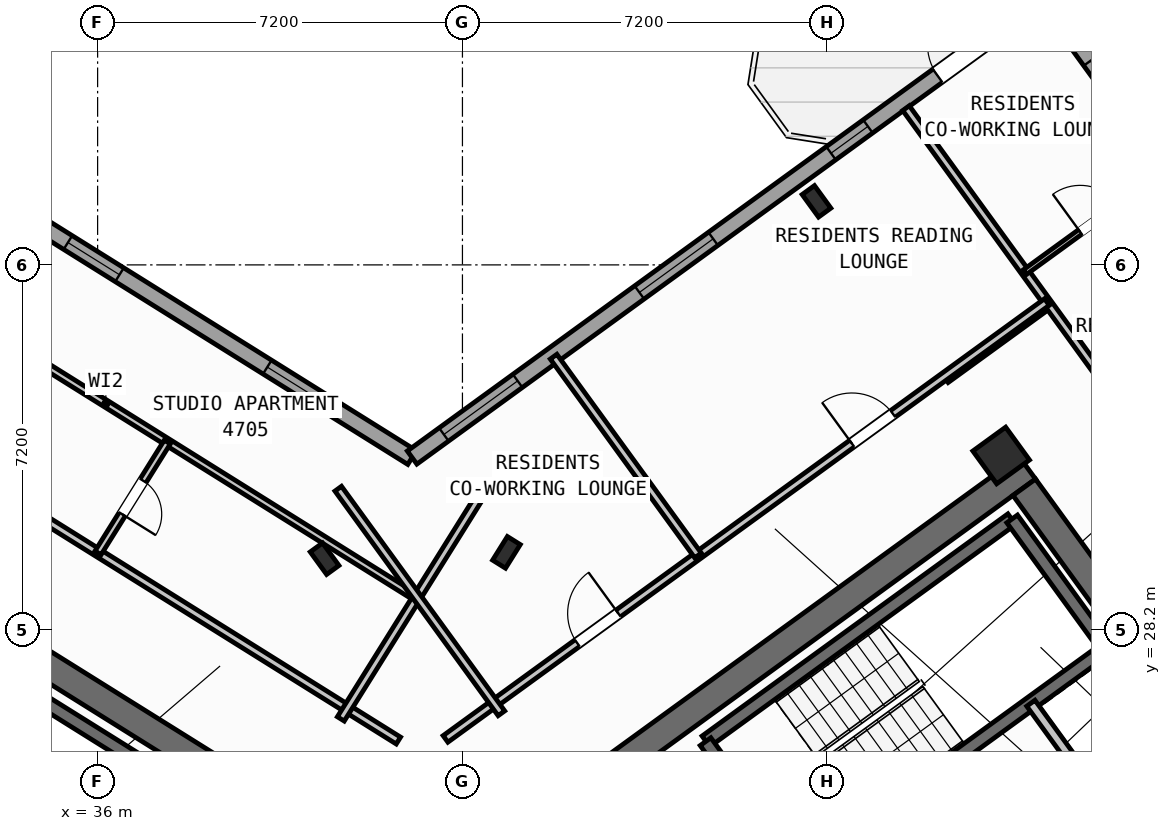
"""IFC4 building model, lengths in metres.
Left out: names, types, materials, properties, quantities, classifications, styles, units other than length and angle.
Written with IfcOpenShell. Run it as: python <this file> out.ifc"""

import sys

from ifc_helpers import new_model, si_unit, direction, frame, frame_2d, origin, origin_2d, place, context, subcontext, project, spatial, rectangle, hollow_rectangle, i_section, extrude, source, transform, mapped, element, fill, save


model = new_model("IFC4")
c1 = context("Model", 3, precision=1e-05, world=origin(), true_north=direction((0.0, 1.0)))
c2 = subcontext(c1, "Body", "Model", "MODEL_VIEW")
j1 = project(units=[si_unit("LENGTHUNIT", "METRE"), si_unit("PLANEANGLEUNIT", "RADIAN")], contexts=[c1])
p1 = place(None, origin())
s1 = spatial("IfcSite", under=j1, at=p1, CompositionType="ELEMENT")
p2 = place(p1, origin())
s2 = spatial("IfcBuilding", under=s1, at=p2, CompositionType="ELEMENT")
p3 = place(p2, frame((0.0, 0.0, 187.8)))
s3 = spatial("IfcBuildingStorey", under=s2, at=p3, CompositionType="ELEMENT", Elevation=187.8)
p4 = place(p3, frame((40.573, 24.01, 0.0), z_axis=(0.0, 0.0, 1.0), x_axis=(-0.848047359947, 0.529920442413, 0.0)))
e1 = element("IfcWall", 1, at=p4, inside=s3, PredefinedType="SHEAR", context=c2, shape_type="SweptSolid", body=[
    extrude(rectangle(XDim=13.14, YDim=0.55, at=frame_2d((6.57, 0.0))), origin(), (0.0, 0.0, 1.0), 3.35),
])
p5 = place(p3, frame((44.365, 24.142, 0.0), z_axis=(0.0, 0.0, 1.0), x_axis=(0.809024304885, 0.587775190107, 0.0)))
e2 = element("IfcWall", 2, at=p5, inside=s3, PredefinedType="SHEAR", context=c2, shape_type="SweptSolid", body=[
    extrude(rectangle(XDim=12.34, YDim=0.55, at=frame_2d((6.17, 0.0))), origin(), (0.0, 0.0, 1.0), 3.35),
])
p6 = place(p3, frame((58.064, 25.813, 0.0), z_axis=(0.0, 0.0, 1.0), x_axis=(-0.587764933797, 0.809031756236, 0.0)))
e3 = element("IfcWall", 3, at=p6, inside=s3, PredefinedType="SHEAR", context=c2, shape_type="SweptSolid", body=[
    extrude(rectangle(XDim=6.425, YDim=0.55, at=frame_2d((3.212, 0.0))), origin(), (0.0, 0.0, 1.0), 3.35),
])
m1 = source(origin(), c2, "Body", "SweptSolid", [
    extrude(i_section(OverallWidth=0.3, OverallDepth=0.55, WebThickness=0.015, FlangeThickness=0.029, at=origin_2d()), origin(), (0.0, 0.0, 1.0), 3.6),
])
for number, where, z_axis, x_axis in (
    (4, (44.068, 29.726, 0.0), (0.0, 0.0, 1.0), (-0.848, 0.53, 0.0)),
    (5, (40.479, 29.601, 0.0), (0.0, 0.0, 1.0), (0.809, 0.588, 0.0)),
):
    element("IfcColumn", number, at=place(p3, frame(where, z_axis=z_axis, x_axis=x_axis)), inside=s3, PredefinedType="COLUMN", context=c2, shape_type="MappedRepresentation", body=[
        mapped(m1, transform((0.0, 0.0, 0.0), scale=1.0)),
    ])
m2 = source(origin(), c2, "Body", "SweptSolid", [
    extrude(hollow_rectangle(XDim=0.8, YDim=0.8, WallThickness=0.032, at=origin_2d()), origin(), (0.0, 0.0, 1.0), 3.6),
])
p7 = place(p3, frame((53.832, 31.638, 0.0), z_axis=(0.0, 0.0, 1.0), x_axis=(0.809016994375, 0.587785252292, 0.0)))
e6 = element("IfcColumn", 6, at=p7, inside=s3, PredefinedType="COLUMN", context=c2, shape_type="MappedRepresentation", body=[
    mapped(m2, transform((0.0, 0.0, 0.0), scale=1.0)),
])
p8 = place(p3, frame((50.188, 36.654, 0.0), z_axis=(0.0, 0.0, 1.0), x_axis=(0.809016994375, 0.587785252292, 0.0)))
e7 = element("IfcColumn", 7, at=p8, inside=s3, PredefinedType="COLUMN", context=c2, shape_type="MappedRepresentation", body=[
    mapped(m1, transform((0.0, 0.0, 0.0), scale=1.0)),
])
p9 = place(p3, frame((17.424, 47.083, 0.0), z_axis=(0.0, 0.0, 1.0), x_axis=(0.848049927979, -0.529916332693, 0.0)))
e8 = element("IfcWall", 8, at=p9, inside=s3, PredefinedType="STANDARD", context=c2, shape_type="SweptSolid", body=[
    extrude(rectangle(XDim=29.223, YDim=0.32, at=frame_2d((14.612, 0.0))), origin(), (0.0, 0.0, 1.0), 3.35),
])
p10 = place(p9, frame((3.764, 0.0, 0.0)))
e9 = element("IfcOpeningElement", 9, at=p10, cuts=e8, PredefinedType="OPENING", context=c2, shape_type="SweptSolid", body=[
    extrude(rectangle(XDim=1.05, YDim=2.15, at=frame_2d((0.525, 1.075))), frame((0.0, 0.17, 0.0), z_axis=(0.0, -1.0, 0.0), x_axis=(1.0, 0.0, 0.0)), (0.0, 0.0, 1.0), 0.34),
])
p11 = place(p9, frame((8.344, 0.0, 0.8)))
e10 = element("IfcOpeningElement", 10, at=p11, cuts=e8, PredefinedType="OPENING", context=c2, shape_type="SweptSolid", body=[
    extrude(rectangle(XDim=2.1, YDim=1.55, at=frame_2d((1.05, 0.775))), frame((0.0, 0.17, 0.0), z_axis=(0.0, -1.0, 0.0), x_axis=(1.0, 0.0, 0.0)), (0.0, 0.0, 1.0), 0.34),
])
p12 = place(p9, frame((13.589, 0.0, 0.85)))
e11 = element("IfcOpeningElement", 11, at=p12, cuts=e8, PredefinedType="OPENING", context=c2, shape_type="SweptSolid", body=[
    extrude(rectangle(XDim=1.8, YDim=1.5, at=frame_2d((0.9, 0.75))), frame((0.0, 0.17, 0.0), z_axis=(0.0, -1.0, 0.0), x_axis=(1.0, 0.0, 0.0)), (0.0, 0.0, 1.0), 0.34),
])
p13 = place(p9, frame((17.104, 0.0, 0.95)))
e12 = element("IfcOpeningElement", 12, at=p13, cuts=e8, PredefinedType="OPENING", context=c2, shape_type="SweptSolid", body=[
    extrude(rectangle(XDim=1.2, YDim=1.4, at=frame_2d((0.6, 0.7))), frame((0.0, 0.17, 0.0), z_axis=(0.0, -1.0, 0.0), x_axis=(1.0, 0.0, 0.0)), (0.0, 0.0, 1.0), 0.34),
])
p14 = place(p9, frame((21.214, 0.0, 0.95)))
e13 = element("IfcOpeningElement", 13, at=p14, cuts=e8, PredefinedType="OPENING", context=c2, shape_type="SweptSolid", body=[
    extrude(rectangle(XDim=1.2, YDim=1.4, at=frame_2d((0.6, 0.7))), frame((0.0, 0.17, 0.0), z_axis=(0.0, -1.0, 0.0), x_axis=(1.0, 0.0, 0.0)), (0.0, 0.0, 1.0), 0.34),
])
p15 = place(p9, frame((25.853, 0.0, 0.95)))
e14 = element("IfcOpeningElement", 14, at=p15, cuts=e8, PredefinedType="OPENING", context=c2, shape_type="SweptSolid", body=[
    extrude(rectangle(XDim=1.2, YDim=1.4, at=frame_2d((0.6, 0.7))), frame((0.0, 0.17, 0.0), z_axis=(0.0, -1.0, 0.0), x_axis=(1.0, 0.0, 0.0)), (0.0, 0.0, 1.0), 0.34),
])
p16 = place(p3, frame((42.207, 31.597, 0.0), z_axis=(0.0, 0.0, 1.0), x_axis=(0.809020333377, 0.587780656523, 0.0)))
e15 = element("IfcWall", 15, at=p16, inside=s3, PredefinedType="STANDARD", context=c2, shape_type="SweptSolid", body=[
    extrude(rectangle(XDim=15.223, YDim=0.32, at=frame_2d((7.611, 0.0))), origin(), (0.0, 0.0, 1.0), 3.35),
])
p17 = place(p16, frame((12.82, 0.0, 0.0)))
e16 = element("IfcOpeningElement", 16, at=p17, cuts=e15, PredefinedType="OPENING", context=c2, shape_type="SweptSolid", body=[
    extrude(rectangle(XDim=1.05, YDim=2.15, at=frame_2d((0.525, 1.075))), frame((0.0, 0.17, 0.0), z_axis=(0.0, -1.0, 0.0), x_axis=(1.0, 0.0, 0.0)), (0.0, 0.0, 1.0), 0.34),
])
p18 = place(p16, frame((0.775, 0.0, 0.85)))
e17 = element("IfcOpeningElement", 17, at=p18, cuts=e15, PredefinedType="OPENING", context=c2, shape_type="SweptSolid", body=[
    extrude(rectangle(XDim=1.8, YDim=1.5, at=frame_2d((0.9, 0.75))), frame((0.0, 0.17, 0.0), z_axis=(0.0, -1.0, 0.0), x_axis=(1.0, 0.0, 0.0)), (0.0, 0.0, 1.0), 0.34),
])
p19 = place(p16, frame((5.544, 0.0, 0.85)))
e18 = element("IfcOpeningElement", 18, at=p19, cuts=e15, PredefinedType="OPENING", context=c2, shape_type="SweptSolid", body=[
    extrude(rectangle(XDim=1.8, YDim=1.5, at=frame_2d((0.9, 0.75))), frame((0.0, 0.17, 0.0), z_axis=(0.0, -1.0, 0.0), x_axis=(1.0, 0.0, 0.0)), (0.0, 0.0, 1.0), 0.34),
])
p20 = place(p16, frame((10.219, 0.0, 1.0)))
e19 = element("IfcOpeningElement", 19, at=p20, cuts=e15, PredefinedType="OPENING", context=c2, shape_type="SweptSolid", body=[
    extrude(rectangle(XDim=0.9, YDim=1.25, at=frame_2d((0.45, 0.625))), frame((0.0, 0.17, 0.0), z_axis=(0.0, -1.0, 0.0), x_axis=(1.0, 0.0, 0.0)), (0.0, 0.0, 1.0), 0.34),
])
p21 = place(p3, frame((54.81, 40.5, 0.0), z_axis=(0.0, 0.0, 1.0), x_axis=(0.587783625747, -0.809018176127, 0.0)))
e20 = element("IfcWall", 20, at=p21, inside=s3, PredefinedType="STANDARD", context=c2, shape_type="SweptSolid", body=[
    extrude(rectangle(XDim=21.587, YDim=0.32, at=frame_2d((10.794, 0.0))), origin(), (0.0, 0.0, 1.0), 2.825),
])
p22 = place(p21, frame((1.328, 0.0, 0.85)))
e21 = element("IfcOpeningElement", 21, at=p22, cuts=e20, PredefinedType="OPENING", context=c2, shape_type="SweptSolid", body=[
    extrude(rectangle(XDim=1.8, YDim=1.5, at=frame_2d((0.9, 0.75))), frame((0.0, 0.17, 0.0), z_axis=(0.0, -1.0, 0.0), x_axis=(1.0, 0.0, 0.0)), (0.0, 0.0, 1.0), 0.34),
])
p23 = place(p21, frame((4.695, 0.0, 1.0)))
e22 = element("IfcOpeningElement", 22, at=p23, cuts=e20, PredefinedType="OPENING", context=c2, shape_type="SweptSolid", body=[
    extrude(rectangle(XDim=0.9, YDim=1.25, at=frame_2d((0.45, 0.625))), frame((0.0, 0.17, 0.0), z_axis=(0.0, -1.0, 0.0), x_axis=(1.0, 0.0, 0.0)), (0.0, 0.0, 1.0), 0.34),
])
p24 = place(p21, frame((7.829, 0.0, 0.85)))
e23 = element("IfcOpeningElement", 23, at=p24, cuts=e20, PredefinedType="OPENING", context=c2, shape_type="SweptSolid", body=[
    extrude(rectangle(XDim=1.5, YDim=1.5, at=frame_2d((0.75, 0.75))), frame((0.0, 0.17, 0.0), z_axis=(0.0, -1.0, 0.0), x_axis=(1.0, 0.0, 0.0)), (0.0, 0.0, 1.0), 0.34),
])
p25 = place(p21, frame((15.542, 0.0, 0.95)))
e24 = element("IfcOpeningElement", 24, at=p25, cuts=e20, PredefinedType="OPENING", context=c2, shape_type="SweptSolid", body=[
    extrude(rectangle(XDim=1.2, YDim=1.4, at=frame_2d((0.6, 0.7))), frame((0.0, 0.17, 0.0), z_axis=(0.0, -1.0, 0.0), x_axis=(1.0, 0.0, 0.0)), (0.0, 0.0, 1.0), 0.34),
])
p26 = place(p21, frame((19.097, 0.0, 1.0)))
e25 = element("IfcOpeningElement", 25, at=p26, cuts=e20, PredefinedType="OPENING", context=c2, shape_type="SweptSolid", body=[
    extrude(rectangle(XDim=0.9, YDim=1.25, at=frame_2d((0.45, 0.625))), frame((0.0, 0.17, 0.0), z_axis=(0.0, -1.0, 0.0), x_axis=(1.0, 0.0, 0.0)), (0.0, 0.0, 1.0), 0.34),
])
p27 = place(p3, frame((39.721, 23.788, 0.0), z_axis=(0.0, 0.0, 1.0), x_axis=(-0.848054434086, 0.529909121291, 0.0)))
e26 = element("IfcWall", 26, at=p27, inside=s3, PredefinedType="SHEAR", context=c2, shape_type="SweptSolid", body=[
    extrude(rectangle(XDim=7.33, YDim=0.26, at=frame_2d((3.665, 0.0))), origin(), (0.0, 0.0, 1.0), 3.35),
])
p28 = place(p3, frame((48.006, 25.996, 0.0), z_axis=(0.0, 0.0, 1.0), x_axis=(0.80901903764, 0.587782439969, 0.0)))
e27 = element("IfcWall", 27, at=p28, inside=s3, PredefinedType="SHEAR", context=c2, shape_type="SweptSolid", body=[
    extrude(rectangle(XDim=7.46, YDim=0.26, at=frame_2d((3.73, 0.0))), origin(), (0.0, 0.0, 1.0), 3.35),
])
p29 = place(p3, frame((49.863, 23.44, 0.0), z_axis=(0.0, 0.0, 1.0), x_axis=(0.809003474932, 0.587803859759, 0.0)))
e28 = element("IfcWall", 28, at=p29, inside=s3, PredefinedType="SHEAR", context=c2, shape_type="SweptSolid", body=[
    extrude(rectangle(XDim=7.46, YDim=0.26, at=frame_2d((3.73, 0.0))), origin(), (0.0, 0.0, 1.0), 3.35),
])
p30 = place(p29, frame((0.36, 0.0, 0.0)))
e29 = element("IfcOpeningElement", 29, at=p30, cuts=e28, PredefinedType="OPENING", context=c2, shape_type="SweptSolid", body=[
    extrude(rectangle(XDim=0.86, YDim=2.05, at=frame_2d((0.43, 1.025))), frame((0.0, 0.14, 0.0), z_axis=(0.0, -1.0, 0.0), x_axis=(1.0, 0.0, 0.0)), (0.0, 0.0, 1.0), 0.28),
])
p31 = place(p3, frame((49.855, 23.434, 0.0), z_axis=(0.0, 0.0, 1.0), x_axis=(-0.58776738483, 0.809029975545, 0.0)))
e30 = element("IfcWall", 30, at=p31, inside=s3, PredefinedType="SHEAR", context=c2, shape_type="SweptSolid", body=[
    extrude(rectangle(XDim=3.16, YDim=0.26, at=frame_2d((1.58, 0.0))), origin(), (0.0, 0.0, 1.0), 3.35),
])
p32 = place(p3, frame((55.906, 27.831, 0.0), z_axis=(0.0, 0.0, 1.0), x_axis=(-0.587804123638, 0.809003283204, 0.0)))
e31 = element("IfcWall", 31, at=p32, inside=s3, PredefinedType="SHEAR", context=c2, shape_type="SweptSolid", body=[
    extrude(rectangle(XDim=3.16, YDim=0.26, at=frame_2d((1.58, 0.0))), origin(), (0.0, 0.0, 1.0), 3.35),
])
p33 = place(p3, frame((56.111, 24.419, 0.0), z_axis=(0.0, 0.0, 1.0), x_axis=(-0.58777848983, 0.809021907548, 0.0)))
e32 = element("IfcWall", 32, at=p33, inside=s3, PredefinedType="STANDARD", context=c2, shape_type="SweptSolid", body=[
    extrude(rectangle(XDim=2.88, YDim=0.2, at=frame_2d((1.44, 0.0))), origin(), (0.0, 0.0, 1.0), 3.34),
])
p34 = place(p3, frame((41.936, 26.012, 0.0), z_axis=(0.0, 0.0, 1.0), x_axis=(-0.848051154596, 0.529914369676, 0.0)))
e33 = element("IfcWall", 33, at=p34, inside=s3, PredefinedType="PARTITIONING", context=c2, shape_type="SweptSolid", body=[
    extrude(rectangle(XDim=15.57, YDim=0.16, at=frame_2d((7.785, 0.0))), origin(), (0.0, 0.0, 1.0), 3.34),
])
p35 = place(p34, frame((10.83, 0.0, 0.0)))
e34 = element("IfcOpeningElement", 34, at=p35, cuts=e33, PredefinedType="OPENING", context=c2, shape_type="SweptSolid", body=[
    extrude(rectangle(XDim=1.0, YDim=2.1, at=frame_2d((0.5, 1.05))), frame((0.0, 0.09, 0.0), z_axis=(0.0, -1.0, 0.0), x_axis=(1.0, 0.0, 0.0)), (0.0, 0.0, 1.0), 0.18),
])
p36 = place(p3, frame((43.704, 31.086, 0.0), z_axis=(0.0, 0.0, 1.0), x_axis=(-0.529906828443, -0.848055866774, 0.0)))
e35 = element("IfcWall", 35, at=p36, inside=s3, PredefinedType="PARTITIONING", context=c2, shape_type="SweptSolid", body=[
    extrude(rectangle(XDim=5.48, YDim=0.16, at=frame_2d((2.74, 0.0))), origin(), (0.0, 0.0, 1.0), 3.34),
])
p37 = place(p3, frame((42.226, 28.873, 0.0), z_axis=(0.0, 0.0, 1.0), x_axis=(-0.848049134363, 0.529917602752, 0.0)))
e36 = element("IfcWall", 36, at=p37, inside=s3, PredefinedType="PLUMBINGWALL", context=c2, shape_type="SweptSolid", body=[
    extrude(rectangle(XDim=14.3, YDim=0.14, at=frame_2d((7.15, 0.0))), origin(), (0.0, 0.0, 1.0), 3.34),
])
p38 = place(p37, frame((9.57, 0.0, 0.0)))
e37 = element("IfcOpeningElement", 37, at=p38, cuts=e36, PredefinedType="OPENING", context=c2, shape_type="SweptSolid", body=[
    extrude(rectangle(XDim=0.92, YDim=2.08, at=frame_2d((0.46, 1.04))), frame((0.0, 0.08, 0.0), z_axis=(0.0, -1.0, 0.0), x_axis=(1.0, 0.0, 0.0)), (0.0, 0.0, 1.0), 0.16),
])
p39 = place(p3, frame((37.375, 31.904, 0.0), z_axis=(0.0, 0.0, 1.0), x_axis=(-0.529913878929, -0.848051461244, 0.0)))
e38 = element("IfcWall", 38, at=p39, inside=s3, PredefinedType="PLUMBINGWALL", context=c2, shape_type="SweptSolid", body=[
    extrude(rectangle(XDim=2.58, YDim=0.14, at=frame_2d((1.29, 0.0))), origin(), (0.0, 0.0, 1.0), 3.34),
])
p40 = place(p39, frame((0.9, 0.0, 0.0)))
e39 = element("IfcOpeningElement", 39, at=p40, cuts=e38, PredefinedType="OPENING", context=c2, shape_type="SweptSolid", body=[
    extrude(rectangle(XDim=0.78, YDim=2.05, at=frame_2d((0.39, 1.025))), frame((0.0, 0.08, 0.0), z_axis=(0.0, -1.0, 0.0), x_axis=(1.0, 0.0, 0.0)), (0.0, 0.0, 1.0), 0.16),
])
p41 = place(p3, frame((52.739, 33.143, 0.0), z_axis=(0.0, 0.0, 1.0), x_axis=(0.809000999347, 0.58780726693, 0.0)))
e40 = element("IfcWall", 40, at=p41, inside=s3, PredefinedType="PARTITIONING", context=c2, shape_type="SweptSolid", body=[
    extrude(rectangle(XDim=2.51, YDim=0.16, at=frame_2d((1.255, 0.0))), origin(), (0.0, 0.0, 1.0), 3.34),
])
p42 = place(p3, frame((58.067, 30.08, 0.0), z_axis=(0.0, 0.0, 1.0), x_axis=(-0.587787785243, 0.809015154073, 0.0)))
e41 = element("IfcWall", 41, at=p42, inside=s3, PredefinedType="PARTITIONING", context=c2, shape_type="SweptSolid", body=[
    extrude(rectangle(XDim=10.4, YDim=0.16, at=frame_2d((5.2, 0.0))), origin(), (0.0, 0.0, 1.0), 3.34),
])
p43 = place(p3, frame((54.304, 35.259, 0.0), z_axis=(0.0, 0.0, 1.0), x_axis=(0.809005039917, 0.58780170584, 0.0)))
e42 = element("IfcWall", 42, at=p43, inside=s3, PredefinedType="PARTITIONING", context=c2, shape_type="SweptSolid", body=[
    extrude(rectangle(XDim=3.61, YDim=0.11, at=frame_2d((1.805, 0.0))), origin(), (0.0, 0.0, 1.0), 3.34),
])
p44 = place(p43, frame((1.345, 0.0, 0.0)))
e43 = element("IfcOpeningElement", 43, at=p44, cuts=e42, PredefinedType="OPENING", context=c2, shape_type="SweptSolid", body=[
    extrude(rectangle(XDim=0.92, YDim=2.08, at=frame_2d((0.46, 1.04))), frame((0.0, 0.065, 0.0), z_axis=(0.0, -1.0, 0.0), x_axis=(1.0, 0.0, 0.0)), (0.0, 0.0, 1.0), 0.13),
])
p45 = place(p3, frame((42.866, 26.044, 0.0), z_axis=(0.0, 0.0, 1.0), x_axis=(0.809020254154, 0.587780765566, 0.0)))
e44 = element("IfcWall", 44, at=p45, inside=s3, PredefinedType="PARTITIONING", context=c2, shape_type="SweptSolid", body=[
    extrude(rectangle(XDim=14.67, YDim=0.16, at=frame_2d((7.335, 0.0))), origin(), (0.0, 0.0, 1.0), 3.34),
])
p46 = place(p45, frame((3.215, 0.0, 0.0)))
e45 = element("IfcOpeningElement", 45, at=p46, cuts=e44, PredefinedType="OPENING", context=c2, shape_type="SweptSolid", body=[
    extrude(rectangle(XDim=1.0, YDim=2.1, at=frame_2d((0.5, 1.05))), frame((0.0, 0.09, 0.0), z_axis=(0.0, -1.0, 0.0), x_axis=(1.0, 0.0, 0.0)), (0.0, 0.0, 1.0), 0.18),
])
p47 = place(p45, frame((9.915, 0.0, 0.0)))
e46 = element("IfcOpeningElement", 46, at=p47, cuts=e44, PredefinedType="OPENING", context=c2, shape_type="SweptSolid", body=[
    extrude(rectangle(XDim=1.0, YDim=2.1, at=frame_2d((0.5, 1.05))), frame((0.0, 0.09, 0.0), z_axis=(0.0, -1.0, 0.0), x_axis=(1.0, 0.0, 0.0)), (0.0, 0.0, 1.0), 0.18),
])
p48 = place(p3, frame((43.969, 26.55, 0.0), z_axis=(0.0, 0.0, 1.0), x_axis=(-0.587776919386, 0.80902304852, 0.0)))
e47 = element("IfcWall", 47, at=p48, inside=s3, PredefinedType="PARTITIONING", context=c2, shape_type="SweptSolid", body=[
    extrude(rectangle(XDim=5.48, YDim=0.16, at=frame_2d((2.74, 0.0))), origin(), (0.0, 0.0, 1.0), 3.34),
])
p49 = place(p3, frame((47.849, 29.665, 0.0), z_axis=(0.0, 0.0, 1.0), x_axis=(-0.587785532001, 0.809016791155, 0.0)))
e48 = element("IfcWall", 48, at=p49, inside=s3, PredefinedType="PARTITIONING", context=c2, shape_type="SweptSolid", body=[
    extrude(rectangle(XDim=4.85, YDim=0.16, at=frame_2d((2.425, 0.0))), origin(), (0.0, 0.0, 1.0), 3.34),
])
m3 = source(origin(), c2, "Body", "SweptSolid", [
    extrude(rectangle(XDim=1.05, YDim=2.15, at=frame_2d((0.525, 1.075))), frame((0.0, 0.025, 0.0), z_axis=(0.0, -1.0, 0.0), x_axis=(1.0, 0.0, 0.0)), (0.0, 0.0, 1.0), 0.05),
])
p50 = place(p17, origin())
e49 = element("IfcDoor", 49, at=p50, inside=s3, OperationType="SINGLE_SWING_RIGHT", PredefinedType="DOOR", context=c2, shape_type="MappedRepresentation", body=[
    mapped(m3, transform((0.0, 0.0, 0.0), scale=1.0)),
])
fill(e16, e49)
m4 = source(origin(), c2, "Body", "SweptSolid", [
    extrude(rectangle(XDim=1.2, YDim=1.4, at=frame_2d((0.6, 0.7))), frame((0.0, 0.03, 0.0), z_axis=(0.0, -1.0, 0.0), x_axis=(1.0, 0.0, 0.0)), (0.0, 0.0, 1.0), 0.06),
])
p51 = place(p14, origin())
e50 = element("IfcWindow", 50, at=p51, inside=s3, PartitioningType="SINGLE_PANEL", PredefinedType="WINDOW", context=c2, shape_type="MappedRepresentation", body=[
    mapped(m4, transform((0.0, 0.0, 0.0), scale=1.0)),
])
fill(e13, e50)
p52 = place(p15, origin())
e51 = element("IfcWindow", 51, at=p52, inside=s3, PartitioningType="SINGLE_PANEL", PredefinedType="WINDOW", context=c2, shape_type="MappedRepresentation", body=[
    mapped(m4, transform((0.0, 0.0, 0.0), scale=1.0)),
])
fill(e14, e51)
m5 = source(origin(), c2, "Body", "SweptSolid", [
    extrude(rectangle(XDim=1.8, YDim=1.5, at=frame_2d((0.9, 0.75))), frame((0.0, 0.03, 0.0), z_axis=(0.0, -1.0, 0.0), x_axis=(1.0, 0.0, 0.0)), (0.0, 0.0, 1.0), 0.06),
])
p53 = place(p18, origin())
e52 = element("IfcWindow", 52, at=p53, inside=s3, PartitioningType="SINGLE_PANEL", PredefinedType="WINDOW", context=c2, shape_type="MappedRepresentation", body=[
    mapped(m5, transform((0.0, 0.0, 0.0), scale=1.0)),
])
fill(e17, e52)
p54 = place(p19, origin())
e53 = element("IfcWindow", 53, at=p54, inside=s3, PartitioningType="SINGLE_PANEL", PredefinedType="WINDOW", context=c2, shape_type="MappedRepresentation", body=[
    mapped(m5, transform((0.0, 0.0, 0.0), scale=1.0)),
])
fill(e18, e53)
m6 = source(origin(), c2, "Body", "SweptSolid", [
    extrude(rectangle(XDim=0.9, YDim=1.25, at=frame_2d((0.45, 0.625))), frame((0.0, 0.03, 0.0), z_axis=(0.0, -1.0, 0.0), x_axis=(1.0, 0.0, 0.0)), (0.0, 0.0, 1.0), 0.06),
])
p55 = place(p20, origin())
e54 = element("IfcWindow", 54, at=p55, inside=s3, PartitioningType="SINGLE_PANEL", PredefinedType="WINDOW", context=c2, shape_type="MappedRepresentation", body=[
    mapped(m6, transform((0.0, 0.0, 0.0), scale=1.0)),
])
fill(e19, e54)
p56 = place(p22, origin())
e55 = element("IfcWindow", 55, at=p56, inside=s3, PartitioningType="SINGLE_PANEL", PredefinedType="WINDOW", context=c2, shape_type="MappedRepresentation", body=[
    mapped(m5, transform((0.0, 0.0, 0.0), scale=1.0)),
])
fill(e21, e55)
m7 = source(origin(), c2, "Body", "SweptSolid", [
    extrude(rectangle(XDim=0.78, YDim=2.05, at=frame_2d((0.39, 1.025))), frame((0.0, 0.025, 0.0), z_axis=(0.0, -1.0, 0.0), x_axis=(1.0, 0.0, 0.0)), (0.0, 0.0, 1.0), 0.05),
])
p57 = place(p40, origin())
e56 = element("IfcDoor", 56, at=p57, inside=s3, OperationType="SINGLE_SWING_RIGHT", PredefinedType="DOOR", context=c2, shape_type="MappedRepresentation", body=[
    mapped(m7, transform((0.0, 0.0, 0.0), scale=1.0)),
])
fill(e39, e56)
m8 = source(origin(), c2, "Body", "SweptSolid", [
    extrude(rectangle(XDim=0.92, YDim=2.08, at=frame_2d((0.46, 1.04))), frame((0.0, 0.025, 0.0), z_axis=(0.0, -1.0, 0.0), x_axis=(1.0, 0.0, 0.0)), (0.0, 0.0, 1.0), 0.05),
])
p58 = place(p44, origin())
e57 = element("IfcDoor", 57, at=p58, inside=s3, OperationType="SINGLE_SWING_LEFT", PredefinedType="DOOR", context=c2, shape_type="MappedRepresentation", body=[
    mapped(m8, transform((0.0, 0.0, 0.0), scale=1.0)),
])
fill(e43, e57)
m9 = source(origin(), c2, "Body", "SweptSolid", [
    extrude(rectangle(XDim=1.0, YDim=2.1, at=frame_2d((0.5, 1.05))), frame((0.0, 0.025, 0.0), z_axis=(0.0, -1.0, 0.0), x_axis=(1.0, 0.0, 0.0)), (0.0, 0.0, 1.0), 0.05),
])
p59 = place(p46, origin())
e58 = element("IfcDoor", 58, at=p59, inside=s3, OperationType="SINGLE_SWING_RIGHT", PredefinedType="DOOR", context=c2, shape_type="MappedRepresentation", body=[
    mapped(m9, transform((0.0, 0.0, 0.0), scale=1.0)),
])
fill(e45, e58)
p60 = place(p47, origin())
e59 = element("IfcDoor", 59, at=p60, inside=s3, OperationType="SINGLE_SWING_LEFT", PredefinedType="DOOR", context=c2, shape_type="MappedRepresentation", body=[
    mapped(m9, transform((0.0, 0.0, 0.0), scale=1.0)),
])
fill(e46, e59)
save(model, sys.argv[1])
